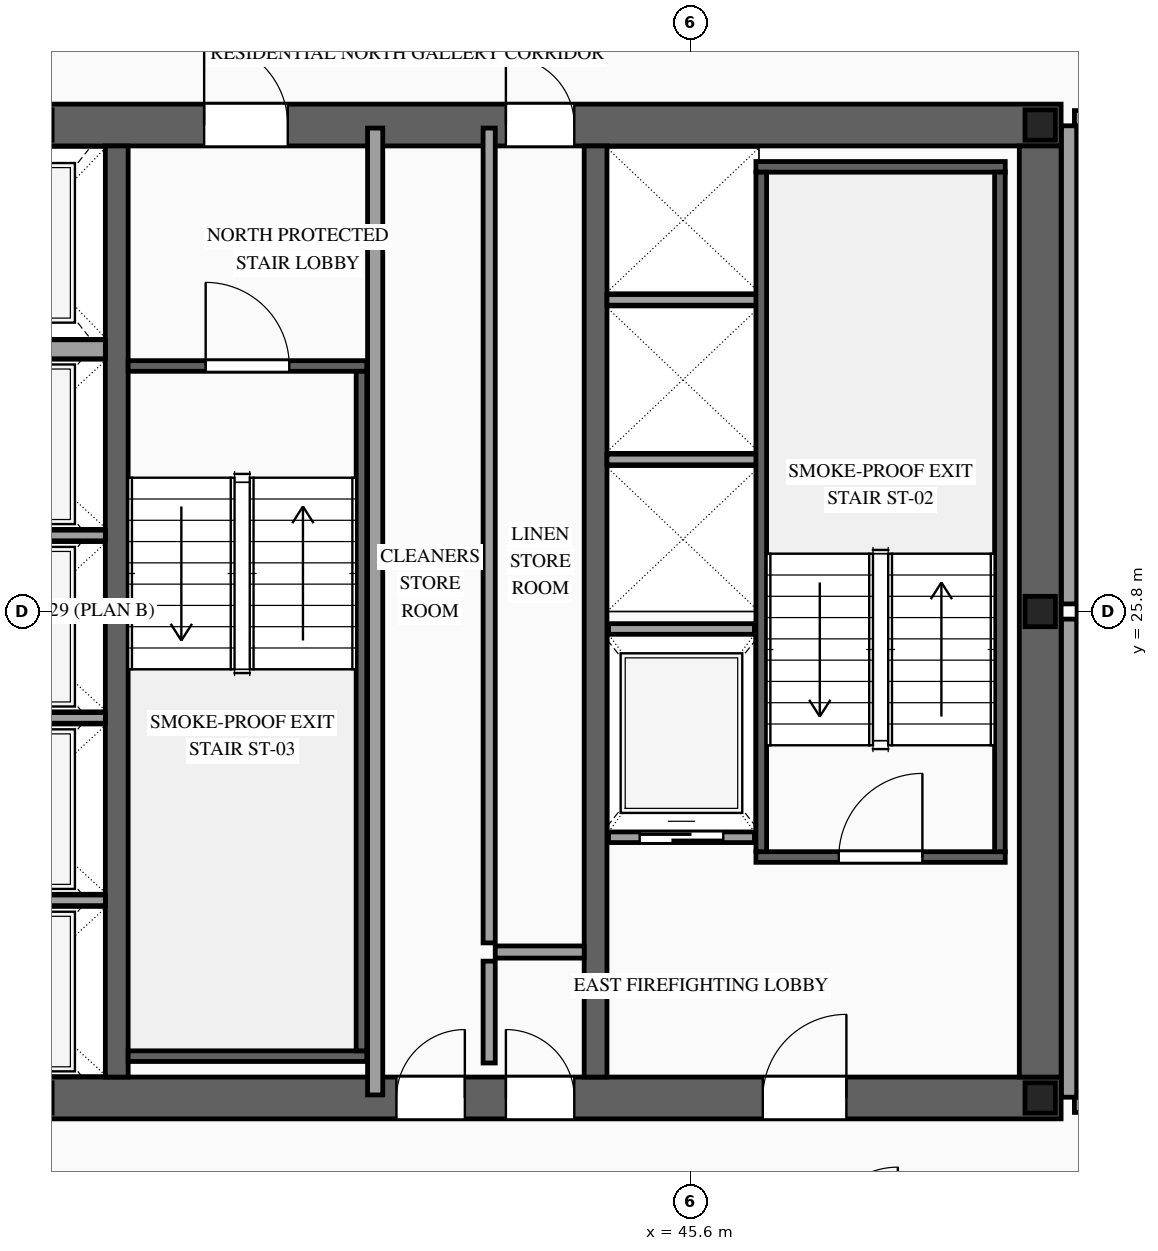
"""IFC4 building model, lengths in metres.
Left out: names, types, materials, properties, quantities, classifications, styles, units other than length and angle.
Written with IfcOpenShell. Run it as: python <this file> out.ifc"""

import sys

from ifc_helpers import new_model, si_unit, direction, frame, frame_2d, origin, origin_2d, place, context, subcontext, project, spatial, rectangle, i_section, extrude, source, transform, mapped, element, fill, save


model = new_model("IFC4")
c1 = context("Model", 3, precision=1e-05, world=origin(), true_north=direction((0.0, 1.0)))
c2 = subcontext(c1, "Body", "Model", "MODEL_VIEW")
j1 = project(units=[si_unit("LENGTHUNIT", "METRE"), si_unit("PLANEANGLEUNIT", "RADIAN")], contexts=[c1])
p1 = place(None, origin())
s1 = spatial("IfcSite", under=j1, at=p1, CompositionType="ELEMENT")
p2 = place(p1, origin())
s2 = spatial("IfcBuilding", under=s1, at=p2, CompositionType="ELEMENT")
p3 = place(p2, frame((0.0, 0.0, 231.1)))
s3 = spatial("IfcBuildingStorey", under=s2, at=p3, CompositionType="ELEMENT", Elevation=231.1)
p4 = place(p3, frame((23.525, 19.4, 0.0), z_axis=(0.0, 0.0, 1.0), x_axis=(1.0, 0.0, 0.0)))
e1 = element("IfcWall", 1, at=p4, inside=s3, PredefinedType="SHEAR", context=c2, shape_type="SweptSolid", body=[
    extrude(rectangle(XDim=26.95, YDim=0.55, at=frame_2d((13.475, 0.0))), origin(), (0.0, 0.0, 1.0), 3.5),
])
p5 = place(p4, frame((1.925, 0.0, 0.0)))
e2 = element("IfcOpeningElement", 2, at=p5, cuts=e1, PredefinedType="OPENING", context=c2, shape_type="SweptSolid", body=[
    extrude(rectangle(XDim=1.1, YDim=2.2, at=frame_2d((0.55, 1.1))), frame((0.0, 0.29, 0.0), z_axis=(0.0, -1.0, 0.0), x_axis=(1.0, 0.0, 0.0)), (0.0, 0.0, 1.0), 0.58),
])
p6 = place(p4, frame((9.825, 0.0, 0.0)))
e3 = element("IfcOpeningElement", 3, at=p6, cuts=e1, PredefinedType="OPENING", context=c2, shape_type="SweptSolid", body=[
    extrude(rectangle(XDim=1.1, YDim=2.2, at=frame_2d((0.55, 1.1))), frame((0.0, 0.29, 0.0), z_axis=(0.0, -1.0, 0.0), x_axis=(1.0, 0.0, 0.0)), (0.0, 0.0, 1.0), 0.58),
])
p7 = place(p4, frame((23.025, 0.0, 0.0)))
e4 = element("IfcOpeningElement", 4, at=p7, cuts=e1, PredefinedType="OPENING", context=c2, shape_type="SweptSolid", body=[
    extrude(rectangle(XDim=1.1, YDim=2.2, at=frame_2d((0.55, 1.1))), frame((0.0, 0.29, 0.0), z_axis=(0.0, -1.0, 0.0), x_axis=(1.0, 0.0, 0.0)), (0.0, 0.0, 1.0), 0.58),
])
p8 = place(p4, frame((19.645, 0.0, 0.0)))
e5 = element("IfcOpeningElement", 5, at=p8, cuts=e1, PredefinedType="OPENING", context=c2, shape_type="SweptSolid", body=[
    extrude(rectangle(XDim=0.9, YDim=2.15, at=frame_2d((0.45, 1.075))), frame((0.0, 0.29, 0.0), z_axis=(0.0, -1.0, 0.0), x_axis=(1.0, 0.0, 0.0)), (0.0, 0.0, 1.0), 0.58),
])
p9 = place(p4, frame((18.205, 0.0, 0.0)))
e6 = element("IfcOpeningElement", 6, at=p9, cuts=e1, PredefinedType="OPENING", context=c2, shape_type="SweptSolid", body=[
    extrude(rectangle(XDim=0.9, YDim=2.15, at=frame_2d((0.45, 1.075))), frame((0.0, 0.29, 0.0), z_axis=(0.0, -1.0, 0.0), x_axis=(1.0, 0.0, 0.0)), (0.0, 0.0, 1.0), 0.58),
])
p10 = place(p3, frame((23.525, 32.2, 0.0), z_axis=(0.0, 0.0, 1.0), x_axis=(1.0, 0.0, 0.0)))
e7 = element("IfcWall", 7, at=p10, inside=s3, PredefinedType="SHEAR", context=c2, shape_type="SweptSolid", body=[
    extrude(rectangle(XDim=26.95, YDim=0.55, at=frame_2d((13.475, 0.0))), origin(), (0.0, 0.0, 1.0), 3.5),
])
p11 = place(p10, frame((4.545, 0.0, 0.0)))
e8 = element("IfcOpeningElement", 8, at=p11, cuts=e7, PredefinedType="OPENING", context=c2, shape_type="SweptSolid", body=[
    extrude(rectangle(XDim=0.9, YDim=2.15, at=frame_2d((0.45, 1.075))), frame((0.0, 0.29, 0.0), z_axis=(0.0, -1.0, 0.0), x_axis=(1.0, 0.0, 0.0)), (0.0, 0.0, 1.0), 0.58),
])
p12 = place(p10, frame((9.825, 0.0, 0.0)))
e9 = element("IfcOpeningElement", 9, at=p12, cuts=e7, PredefinedType="OPENING", context=c2, shape_type="SweptSolid", body=[
    extrude(rectangle(XDim=1.1, YDim=2.2, at=frame_2d((0.55, 1.1))), frame((0.0, 0.29, 0.0), z_axis=(0.0, -1.0, 0.0), x_axis=(1.0, 0.0, 0.0)), (0.0, 0.0, 1.0), 0.58),
])
p13 = place(p10, frame((15.675, 0.0, 0.0)))
e10 = element("IfcOpeningElement", 10, at=p13, cuts=e7, PredefinedType="OPENING", context=c2, shape_type="SweptSolid", body=[
    extrude(rectangle(XDim=1.1, YDim=2.2, at=frame_2d((0.55, 1.1))), frame((0.0, 0.29, 0.0), z_axis=(0.0, -1.0, 0.0), x_axis=(1.0, 0.0, 0.0)), (0.0, 0.0, 1.0), 0.58),
])
p14 = place(p10, frame((19.645, 0.0, 0.0)))
e11 = element("IfcOpeningElement", 11, at=p14, cuts=e7, PredefinedType="OPENING", context=c2, shape_type="SweptSolid", body=[
    extrude(rectangle(XDim=0.9, YDim=2.15, at=frame_2d((0.45, 1.075))), frame((0.0, 0.29, 0.0), z_axis=(0.0, -1.0, 0.0), x_axis=(1.0, 0.0, 0.0)), (0.0, 0.0, 1.0), 0.58),
])
m1 = source(origin(), c2, "Body", "SweptSolid", [
    extrude(rectangle(XDim=12.25, YDim=0.55, at=frame_2d((6.125, 0.0))), origin(), (0.0, 0.0, 1.0), 3.5),
])
p15 = place(p3, frame((50.2, 19.675, 0.0), z_axis=(0.0, 0.0, 1.0), x_axis=(0.0, 1.0, 0.0)))
e12 = element("IfcWall", 12, at=p15, inside=s3, PredefinedType="SHEAR", context=c2, shape_type="MappedRepresentation", body=[
    mapped(m1, transform((0.0, 0.0, 0.0), scale=1.0)),
])
m2 = source(origin(), c2, "Body", "SweptSolid", [
    extrude(rectangle(XDim=12.25, YDim=0.3, at=frame_2d((6.125, 0.0))), origin(), (0.0, 0.0, 1.0), 3.5),
])
for number, where, z_axis, x_axis in (
    (13, (38.05, 19.675, 0.0), (0.0, 0.0, 1.0), (0.0, 1.0, 0.0)),
    (14, (44.35, 19.675, 0.0), (0.0, 0.0, 1.0), (0.0, 1.0, 0.0)),
):
    element("IfcWall", number, at=place(p3, frame(where, z_axis=z_axis, x_axis=x_axis)), inside=s3, PredefinedType="SOLIDWALL", context=c2, shape_type="MappedRepresentation", body=[
        mapped(m2, transform((0.0, 0.0, 0.0), scale=1.0)),
    ])
m3 = source(origin(), c2, "Body", "SweptSolid", [
    extrude(i_section(OverallWidth=0.4, OverallDepth=0.4, WebThickness=0.013, FlangeThickness=0.021, at=origin_2d()), origin(), (0.0, 0.0, 1.0), 3.5),
])
for number, where, z_axis, x_axis in (
    (15, (50.2, 19.4, 0.0), (0.0, 0.0, 1.0), (1.0, 0.0, 0.0)),
    (16, (50.2, 25.8, 0.0), (0.0, 0.0, 1.0), (1.0, 0.0, 0.0)),
    (17, (50.2, 32.2, 0.0), (0.0, 0.0, 1.0), (1.0, 0.0, 0.0)),
):
    element("IfcColumn", number, at=place(p3, frame(where, z_axis=z_axis, x_axis=x_axis)), inside=s3, PredefinedType="COLUMN", context=c2, shape_type="MappedRepresentation", body=[
        mapped(m3, transform((0.0, 0.0, 0.0), scale=1.0)),
    ])
p16 = place(p3, frame((44.52, 22.83, 0.0), z_axis=(0.0, 0.0, 1.0), x_axis=(1.0, 0.0, 0.0)))
e18 = element("IfcWall", 18, at=p16, inside=s3, PredefinedType="SOLIDWALL", context=c2, shape_type="SweptSolid", body=[
    extrude(rectangle(XDim=1.92, YDim=0.14, at=frame_2d((0.96, 0.0))), origin(), (0.0, 0.0, 1.0), 3.28),
])
p17 = place(p16, frame((0.41, 0.0, 0.0)))
e19 = element("IfcOpeningElement", 19, at=p17, cuts=e18, PredefinedType="OPENING", context=c2, shape_type="SweptSolid", body=[
    extrude(rectangle(XDim=1.1, YDim=2.2, at=frame_2d((0.55, 1.1))), frame((0.0, 0.085, 0.0), z_axis=(0.0, -1.0, 0.0), x_axis=(1.0, 0.0, 0.0)), (0.0, 0.0, 1.0), 0.17),
])
m4 = source(origin(), c2, "Body", "SweptSolid", [
    extrude(rectangle(XDim=1.92, YDim=0.14, at=frame_2d((0.96, 0.0))), origin(), (0.0, 0.0, 1.0), 3.28),
])
p18 = place(p3, frame((44.52, 25.57, 0.0), z_axis=(0.0, 0.0, 1.0), x_axis=(1.0, 0.0, 0.0)))
e20 = element("IfcWall", 20, at=p18, inside=s3, PredefinedType="SOLIDWALL", context=c2, shape_type="MappedRepresentation", body=[
    mapped(m4, transform((0.0, 0.0, 0.0), scale=1.0)),
])
m5 = source(origin(), c2, "Body", "SweptSolid", [
    extrude(rectangle(XDim=2.4, YDim=0.14, at=frame_2d((1.2, 0.0))), origin(), (0.0, 0.0, 1.0), 3.28),
])
for number, where, z_axis, x_axis in (
    (21, (35.5, 22.0, 0.0), (0.0, 0.0, 1.0), (1.0, 0.0, 0.0)),
    (22, (35.5, 24.4, 0.0), (0.0, 0.0, 1.0), (1.0, 0.0, 0.0)),
    (23, (35.5, 26.8, 0.0), (0.0, 0.0, 1.0), (1.0, 0.0, 0.0)),
):
    element("IfcWall", number, at=place(p3, frame(where, z_axis=z_axis, x_axis=x_axis)), inside=s3, PredefinedType="SOLIDWALL", context=c2, shape_type="MappedRepresentation", body=[
        mapped(m5, transform((0.0, 0.0, 0.0), scale=1.0)),
    ])
m6 = source(origin(), c2, "Body", "SweptSolid", [
    extrude(rectangle(XDim=2.4, YDim=0.25, at=frame_2d((1.2, 0.0))), origin(), (0.0, 0.0, 1.0), 3.28),
])
p19 = place(p3, frame((35.5, 29.25, 0.0), z_axis=(0.0, 0.0, 1.0), x_axis=(1.0, 0.0, 0.0)))
e24 = element("IfcWall", 24, at=p19, inside=s3, PredefinedType="SOLIDWALL", context=c2, shape_type="MappedRepresentation", body=[
    mapped(m6, transform((0.0, 0.0, 0.0), scale=1.0)),
])
m7 = source(origin(), c2, "Body", "SweptSolid", [
    extrude(rectangle(XDim=2.0, YDim=0.14, at=frame_2d((1.0, 0.0))), origin(), (0.0, 0.0, 1.0), 3.28),
])
for number, where, z_axis, x_axis in (
    (25, (44.5, 27.8, 0.0), (0.0, 0.0, 1.0), (1.0, 0.0, 0.0)),
    (26, (44.5, 29.9, 0.0), (0.0, 0.0, 1.0), (1.0, 0.0, 0.0)),
):
    element("IfcWall", number, at=place(p3, frame(where, z_axis=z_axis, x_axis=x_axis)), inside=s3, PredefinedType="SOLIDWALL", context=c2, shape_type="MappedRepresentation", body=[
        mapped(m7, transform((0.0, 0.0, 0.0), scale=1.0)),
    ])
p20 = place(p3, frame((46.46, 22.57, 0.0), z_axis=(0.0, 0.0, 1.0), x_axis=(1.0, 0.0, 0.0)))
e27 = element("IfcWall", 27, at=p20, inside=s3, PredefinedType="SOLIDWALL", context=c2, shape_type="SweptSolid", body=[
    extrude(rectangle(XDim=3.28, YDim=0.14, at=frame_2d((1.64, 0.0))), origin(), (0.0, 0.0, 1.0), 3.28),
])
p21 = place(p20, frame((1.09, 0.0, 0.0)))
e28 = element("IfcOpeningElement", 28, at=p21, cuts=e27, PredefinedType="OPENING", context=c2, shape_type="SweptSolid", body=[
    extrude(rectangle(XDim=1.1, YDim=2.2, at=frame_2d((0.55, 1.1))), frame((0.0, 0.085, 0.0), z_axis=(0.0, -1.0, 0.0), x_axis=(1.0, 0.0, 0.0)), (0.0, 0.0, 1.0), 0.17),
])
m8 = source(origin(), c2, "Body", "SweptSolid", [
    extrude(rectangle(XDim=3.28, YDim=0.14, at=frame_2d((1.64, 0.0))), origin(), (0.0, 0.0, 1.0), 3.28),
])
p22 = place(p3, frame((46.46, 31.65, 0.0), z_axis=(0.0, 0.0, 1.0), x_axis=(1.0, 0.0, 0.0)))
e29 = element("IfcWall", 29, at=p22, inside=s3, PredefinedType="SOLIDWALL", context=c2, shape_type="MappedRepresentation", body=[
    mapped(m8, transform((0.0, 0.0, 0.0), scale=1.0)),
])
m9 = source(origin(), c2, "Body", "SweptSolid", [
    extrude(rectangle(XDim=8.94, YDim=0.14, at=frame_2d((4.47, 0.0))), origin(), (0.0, 0.0, 1.0), 3.28),
])
for number, where, z_axis, x_axis in (
    (30, (46.53, 22.64, 0.0), (0.0, 0.0, 1.0), (0.0, 1.0, 0.0)),
    (31, (49.67, 22.64, 0.0), (0.0, 0.0, 1.0), (0.0, 1.0, 0.0)),
):
    element("IfcWall", number, at=place(p3, frame(where, z_axis=z_axis, x_axis=x_axis)), inside=s3, PredefinedType="SOLIDWALL", context=c2, shape_type="MappedRepresentation", body=[
        mapped(m9, transform((0.0, 0.0, 0.0), scale=1.0)),
    ])
p23 = place(p3, frame((38.2, 29.03, 0.0), z_axis=(0.0, 0.0, 1.0), x_axis=(1.0, 0.0, 0.0)))
e32 = element("IfcWall", 32, at=p23, inside=s3, PredefinedType="SOLIDWALL", context=c2, shape_type="SweptSolid", body=[
    extrude(rectangle(XDim=3.14, YDim=0.14, at=frame_2d((1.57, 0.0))), origin(), (0.0, 0.0, 1.0), 3.28),
])
p24 = place(p23, frame((1.02, 0.0, 0.0)))
e33 = element("IfcOpeningElement", 33, at=p24, cuts=e32, PredefinedType="OPENING", context=c2, shape_type="SweptSolid", body=[
    extrude(rectangle(XDim=1.1, YDim=2.2, at=frame_2d((0.55, 1.1))), frame((0.0, 0.085, 0.0), z_axis=(0.0, -1.0, 0.0), x_axis=(1.0, 0.0, 0.0)), (0.0, 0.0, 1.0), 0.17),
])
m10 = source(origin(), c2, "Body", "SweptSolid", [
    extrude(rectangle(XDim=3.14, YDim=0.14, at=frame_2d((1.57, 0.0))), origin(), (0.0, 0.0, 1.0), 3.28),
])
p25 = place(p3, frame((38.2, 19.95, 0.0), z_axis=(0.0, 0.0, 1.0), x_axis=(1.0, 0.0, 0.0)))
e34 = element("IfcWall", 34, at=p25, inside=s3, PredefinedType="SOLIDWALL", context=c2, shape_type="MappedRepresentation", body=[
    mapped(m10, transform((0.0, 0.0, 0.0), scale=1.0)),
])
m11 = source(origin(), c2, "Body", "SweptSolid", [
    extrude(rectangle(XDim=8.94, YDim=0.14, at=frame_2d((4.47, 0.0))), origin(), (0.0, 0.0, 1.0), 3.28),
])
p26 = place(p3, frame((41.27, 20.02, 0.0), z_axis=(0.0, 0.0, 1.0), x_axis=(0.0, 1.0, 0.0)))
e35 = element("IfcWall", 35, at=p26, inside=s3, PredefinedType="SOLIDWALL", context=c2, shape_type="MappedRepresentation", body=[
    mapped(m11, transform((0.0, 0.0, 0.0), scale=1.0)),
])
m12 = source(origin(), c2, "Body", "SweptSolid", [
    extrude(rectangle(XDim=1.34, YDim=0.16, at=frame_2d((0.67, 0.0))), origin(), (0.0, 0.0, 1.0), 3.28),
])
p27 = place(p3, frame((42.95, 19.86, 0.0), z_axis=(0.0, 0.0, 1.0), x_axis=(0.0, 1.0, 0.0)))
e36 = element("IfcWall", 36, at=p27, inside=s3, PredefinedType="PARTITIONING", context=c2, shape_type="MappedRepresentation", body=[
    mapped(m12, transform((0.0, 0.0, 0.0), scale=1.0)),
])
m13 = source(origin(), c2, "Body", "SweptSolid", [
    extrude(rectangle(XDim=1.17, YDim=0.16, at=frame_2d((0.585, 0.0))), origin(), (0.0, 0.0, 1.0), 3.28),
])
p28 = place(p3, frame((43.03, 21.32, 0.0), z_axis=(0.0, 0.0, 1.0), x_axis=(1.0, 0.0, 0.0)))
e37 = element("IfcWall", 37, at=p28, inside=s3, PredefinedType="PARTITIONING", context=c2, shape_type="MappedRepresentation", body=[
    mapped(m13, transform((0.0, 0.0, 0.0), scale=1.0)),
])
m14 = source(origin(), c2, "Body", "SweptSolid", [
    extrude(rectangle(XDim=12.72, YDim=0.2, at=frame_2d((6.36, 0.0))), origin(), (0.0, 0.0, 1.0), 3.28),
])
p29 = place(p3, frame((41.45, 19.44, 0.0), z_axis=(0.0, 0.0, 1.0), x_axis=(0.0, 1.0, 0.0)))
e38 = element("IfcWall", 38, at=p29, inside=s3, PredefinedType="PARTITIONING", context=c2, shape_type="MappedRepresentation", body=[
    mapped(m14, transform((0.0, 0.0, 0.0), scale=1.0)),
])
m15 = source(origin(), c2, "Body", "SweptSolid", [
    extrude(rectangle(XDim=10.72, YDim=0.16, at=frame_2d((5.36, 0.0))), origin(), (0.0, 0.0, 1.0), 3.28),
])
p30 = place(p3, frame((42.95, 21.44, 0.0), z_axis=(0.0, 0.0, 1.0), x_axis=(0.0, 1.0, 0.0)))
e39 = element("IfcWall", 39, at=p30, inside=s3, PredefinedType="PARTITIONING", context=c2, shape_type="MappedRepresentation", body=[
    mapped(m15, transform((0.0, 0.0, 0.0), scale=1.0)),
])
p31 = place(p3, frame((50.65, 19.31, 0.0), z_axis=(0.0, 0.0, 1.0), x_axis=(1.0, 0.0, 0.0)))
e40 = element("IfcWall", 40, at=p31, inside=s3, PredefinedType="PARTITIONING", context=c2, shape_type="SweptSolid", body=[
    extrude(rectangle(XDim=6.8, YDim=0.2, at=frame_2d((3.4, 0.0))), origin(), (0.0, 0.0, 1.0), 2.825),
])
p32 = place(p31, frame((2.8, 0.0, 0.0)))
e41 = element("IfcOpeningElement", 41, at=p32, cuts=e40, PredefinedType="OPENING", context=c2, shape_type="SweptSolid", body=[
    extrude(rectangle(XDim=1.0, YDim=2.2, at=frame_2d((0.5, 1.1))), frame((0.0, 0.115, 0.0), z_axis=(0.0, -1.0, 0.0), x_axis=(1.0, 0.0, 0.0)), (0.0, 0.0, 1.0), 0.23),
])
m16 = source(origin(), c2, "Body", "SweptSolid", [
    extrude(rectangle(XDim=6.765, YDim=0.2, at=frame_2d((3.382, 0.0))), origin(), (0.0, 0.0, 1.0), 2.787),
])
p33 = place(p3, frame((50.685, 25.8, 0.0), z_axis=(0.0, 0.0, 1.0), x_axis=(1.0, 0.0, 0.0)))
e42 = element("IfcWall", 42, at=p33, inside=s3, PredefinedType="PARTITIONING", context=c2, shape_type="MappedRepresentation", body=[
    mapped(m16, transform((0.0, 0.0, 0.0), scale=1.0)),
])
m17 = source(origin(), c2, "Body", "SweptSolid", [
    extrude(rectangle(XDim=6.29, YDim=0.2, at=frame_2d((3.145, 0.0))), origin(), (0.0, 0.0, 1.0), 3.28),
])
p34 = place(p3, frame((50.58, 19.41, 0.0), z_axis=(0.0, 0.0, 1.0), x_axis=(0.0, 1.0, 0.0)))
e43 = element("IfcWall", 43, at=p34, inside=s3, PredefinedType="PARTITIONING", context=c2, shape_type="MappedRepresentation", body=[
    mapped(m17, transform((0.0, 0.0, 0.0), scale=1.0)),
])
p35 = place(p3, frame((50.65, 32.29, 0.0), z_axis=(0.0, 0.0, 1.0), x_axis=(1.0, 0.0, 0.0)))
e44 = element("IfcWall", 44, at=p35, inside=s3, PredefinedType="PARTITIONING", context=c2, shape_type="SweptSolid", body=[
    extrude(rectangle(XDim=6.8, YDim=0.2, at=frame_2d((3.4, 0.0))), origin(), (0.0, 0.0, 1.0), 2.825),
])
p36 = place(p35, frame((2.835, 0.0, 0.0)))
e45 = element("IfcOpeningElement", 45, at=p36, cuts=e44, PredefinedType="OPENING", context=c2, shape_type="SweptSolid", body=[
    extrude(rectangle(XDim=1.0, YDim=2.2, at=frame_2d((0.5, 1.1))), frame((0.0, 0.115, 0.0), z_axis=(0.0, -1.0, 0.0), x_axis=(1.0, 0.0, 0.0)), (0.0, 0.0, 1.0), 0.23),
])
p37 = place(p3, frame((50.58, 25.9, 0.0), z_axis=(0.0, 0.0, 1.0), x_axis=(0.0, 1.0, 0.0)))
e46 = element("IfcWall", 46, at=p37, inside=s3, PredefinedType="PARTITIONING", context=c2, shape_type="MappedRepresentation", body=[
    mapped(m17, transform((0.0, 0.0, 0.0), scale=1.0)),
])
m18 = source(origin(), c2, "Body", "SweptSolid", [
    extrude(rectangle(XDim=1.1, YDim=2.2, at=frame_2d((0.55, 1.1))), frame((0.0, 0.025, 0.0), z_axis=(0.0, -1.0, 0.0), x_axis=(1.0, 0.0, 0.0)), (0.0, 0.0, 1.0), 0.05),
])
p38 = place(p17, origin())
e47 = element("IfcDoor", 47, at=p38, inside=s3, OperationType="SLIDING_TO_RIGHT", PredefinedType="DOOR", context=c2, shape_type="MappedRepresentation", body=[
    mapped(m18, transform((0.0, 0.0, 0.0), scale=1.0)),
])
fill(e19, e47)
m19 = source(origin(), c2, "Body", "SweptSolid", [
    extrude(rectangle(XDim=1.1, YDim=2.2, at=frame_2d((0.55, 1.1))), frame((0.0, 0.025, 0.0), z_axis=(0.0, -1.0, 0.0), x_axis=(1.0, 0.0, 0.0)), (0.0, 0.0, 1.0), 0.05),
])
p39 = place(p21, origin())
e48 = element("IfcDoor", 48, at=p39, inside=s3, OperationType="SINGLE_SWING_RIGHT", PredefinedType="DOOR", context=c2, shape_type="MappedRepresentation", body=[
    mapped(m19, transform((0.0, 0.0, 0.0), scale=1.0)),
])
fill(e28, e48)
p40 = place(p24, origin())
e49 = element("IfcDoor", 49, at=p40, inside=s3, OperationType="SINGLE_SWING_LEFT", PredefinedType="DOOR", context=c2, shape_type="MappedRepresentation", body=[
    mapped(m19, transform((0.0, 0.0, 0.0), scale=1.0)),
])
fill(e33, e49)
p41 = place(p7, origin())
e50 = element("IfcDoor", 50, at=p41, inside=s3, OperationType="SINGLE_SWING_RIGHT", PredefinedType="DOOR", context=c2, shape_type="MappedRepresentation", body=[
    mapped(m19, transform((0.0, 0.0, 0.0), scale=1.0)),
])
fill(e4, e50)
p42 = place(p13, origin())
e51 = element("IfcDoor", 51, at=p42, inside=s3, OperationType="SINGLE_SWING_LEFT", PredefinedType="DOOR", context=c2, shape_type="MappedRepresentation", body=[
    mapped(m19, transform((0.0, 0.0, 0.0), scale=1.0)),
])
fill(e10, e51)
m20 = source(origin(), c2, "Body", "SweptSolid", [
    extrude(rectangle(XDim=0.9, YDim=2.15, at=frame_2d((0.45, 1.075))), frame((0.0, 0.025, 0.0), z_axis=(0.0, -1.0, 0.0), x_axis=(1.0, 0.0, 0.0)), (0.0, 0.0, 1.0), 0.05),
])
p43 = place(p8, origin())
e52 = element("IfcDoor", 52, at=p43, inside=s3, OperationType="SINGLE_SWING_LEFT", PredefinedType="DOOR", context=c2, shape_type="MappedRepresentation", body=[
    mapped(m20, transform((0.0, 0.0, 0.0), scale=1.0)),
])
fill(e5, e52)
p44 = place(p9, origin())
e53 = element("IfcDoor", 53, at=p44, inside=s3, OperationType="SINGLE_SWING_RIGHT", PredefinedType="DOOR", context=c2, shape_type="MappedRepresentation", body=[
    mapped(m20, transform((0.0, 0.0, 0.0), scale=1.0)),
])
fill(e6, e53)
p45 = place(p14, origin())
e54 = element("IfcDoor", 54, at=p45, inside=s3, OperationType="SINGLE_SWING_LEFT", PredefinedType="DOOR", context=c2, shape_type="MappedRepresentation", body=[
    mapped(m20, transform((0.0, 0.0, 0.0), scale=1.0)),
])
fill(e11, e54)
save(model, sys.argv[1])
